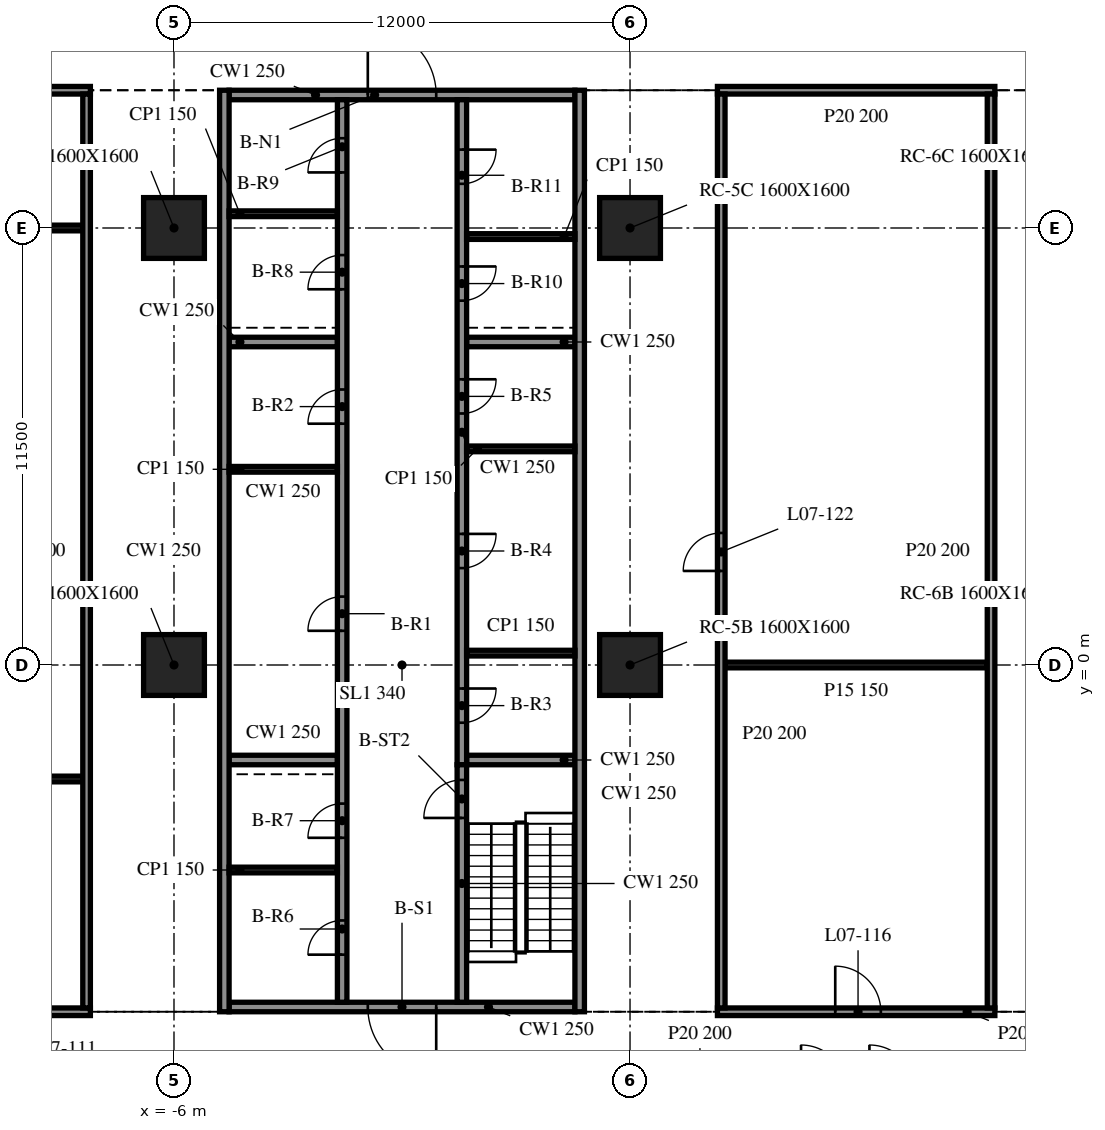
"""IFC4 building model, lengths in metres.
Left out: names, types, materials, properties, quantities, classifications, styles, units other than length and angle.
Written with IfcOpenShell. Run it as: python <this file> out.ifc"""

import sys

from ifc_helpers import new_model, si_unit, direction, frame, frame_2d, origin, origin_2d, place, context, subcontext, project, spatial, rectangle, extrude, element, fill, save


model = new_model("IFC4")
c1 = context("Model", 3, precision=1e-05, world=origin(), true_north=direction((0.0, 1.0)))
c2 = subcontext(c1, "Body", "Model", "MODEL_VIEW")
j1 = project(units=[si_unit("LENGTHUNIT", "METRE"), si_unit("PLANEANGLEUNIT", "RADIAN")], contexts=[c1])
p1 = place(None, origin())
s1 = spatial("IfcSite", under=j1, at=p1, CompositionType="ELEMENT")
p2 = place(p1, origin())
s2 = spatial("IfcBuilding", under=s1, at=p2, CompositionType="ELEMENT")
p3 = place(p2, frame((0.0, 0.0, 33.0)))
s3 = spatial("IfcBuildingStorey", under=s2, at=p3, CompositionType="ELEMENT", Elevation=33.0)
for number, where, z_axis, x_axis in (
    (1, (-6.0, 0.0, -0.34), (0.0, 0.0, 1.0), (1.0, 0.0, 0.0)),
    (2, (-6.0, 11.5, -0.34), (0.0, 0.0, 1.0), (1.0, 0.0, 0.0)),
    (3, (6.0, 0.0, -0.34), (0.0, 0.0, 1.0), (1.0, 0.0, 0.0)),
    (4, (6.0, 11.5, -0.34), (0.0, 0.0, 1.0), (1.0, 0.0, 0.0)),
):
    element("IfcColumn", number, at=place(p3, frame(where, z_axis=z_axis, x_axis=x_axis)), inside=s3, PredefinedType="COLUMN", context=c2, shape_type="SweptSolid", body=[
        extrude(rectangle(XDim=1.6, YDim=1.6, at=origin_2d()), origin(), (0.0, 0.0, 1.0), 4.3),
    ])
for number, where, z_axis, x_axis in (
    (5, (-4.675, 15.125, 0.0), (0.0, 0.0, 1.0), (0.0, -1.0, 0.0)),
    (6, (4.675, -9.125, 0.0), (0.0, 0.0, 1.0), (0.0, 1.0, 0.0)),
):
    element("IfcWall", number, at=place(p3, frame(where, z_axis=z_axis, x_axis=x_axis)), inside=s3, PredefinedType="SOLIDWALL", context=c2, shape_type="SweptSolid", body=[
        extrude(rectangle(XDim=24.25, YDim=0.25, at=frame_2d((12.125, 0.0))), origin(), (0.0, 0.0, 1.0), 3.96),
    ])
p4 = place(p3, frame((4.55, -9.0, 0.0), z_axis=(0.0, 0.0, 1.0), x_axis=(-1.0, 0.0, 0.0)))
e7 = element("IfcWall", 7, at=p4, inside=s3, PredefinedType="SOLIDWALL", context=c2, shape_type="SweptSolid", body=[
    extrude(rectangle(XDim=9.1, YDim=0.25, at=frame_2d((4.55, 0.0))), origin(), (0.0, 0.0, 1.0), 3.96),
])
p5 = place(p4, frame((3.65, 0.0, 0.0)))
e8 = element("IfcOpeningElement", 8, at=p5, cuts=e7, PredefinedType="OPENING", context=c2, shape_type="SweptSolid", body=[
    extrude(rectangle(XDim=1.8, YDim=2.1, at=frame_2d((0.9, 1.05))), frame((0.0, 0.135, 0.0), z_axis=(0.0, -1.0, 0.0), x_axis=(1.0, 0.0, 0.0)), (0.0, 0.0, 1.0), 0.27),
])
p6 = place(p3, frame((-4.55, 15.0, 0.0), z_axis=(0.0, 0.0, 1.0), x_axis=(1.0, 0.0, 0.0)))
e9 = element("IfcWall", 9, at=p6, inside=s3, PredefinedType="SOLIDWALL", context=c2, shape_type="SweptSolid", body=[
    extrude(rectangle(XDim=9.1, YDim=0.25, at=frame_2d((4.55, 0.0))), origin(), (0.0, 0.0, 1.0), 3.96),
])
p7 = place(p6, frame((3.65, 0.0, 0.0)))
e10 = element("IfcOpeningElement", 10, at=p7, cuts=e9, PredefinedType="OPENING", context=c2, shape_type="SweptSolid", body=[
    extrude(rectangle(XDim=1.8, YDim=2.1, at=frame_2d((0.9, 1.05))), frame((0.0, 0.135, 0.0), z_axis=(0.0, -1.0, 0.0), x_axis=(1.0, 0.0, 0.0)), (0.0, 0.0, 1.0), 0.27),
])
p8 = place(p3, frame((-1.575, -8.875, 0.0), z_axis=(0.0, 0.0, 1.0), x_axis=(0.0, 1.0, 0.0)))
e11 = element("IfcWall", 11, at=p8, inside=s3, PredefinedType="SOLIDWALL", context=c2, shape_type="SweptSolid", body=[
    extrude(rectangle(XDim=23.75, YDim=0.25, at=frame_2d((11.875, 0.0))), origin(), (0.0, 0.0, 1.0), 3.96),
])
p9 = place(p8, frame((9.775, 0.0, 0.0)))
e12 = element("IfcOpeningElement", 12, at=p9, cuts=e11, PredefinedType="OPENING", context=c2, shape_type="SweptSolid", body=[
    extrude(rectangle(XDim=0.9, YDim=2.1, at=frame_2d((0.45, 1.05))), frame((0.0, 0.135, 0.0), z_axis=(0.0, -1.0, 0.0), x_axis=(1.0, 0.0, 0.0)), (0.0, 0.0, 1.0), 0.27),
])
p10 = place(p8, frame((15.225, 0.0, 0.0)))
e13 = element("IfcOpeningElement", 13, at=p10, cuts=e11, PredefinedType="OPENING", context=c2, shape_type="SweptSolid", body=[
    extrude(rectangle(XDim=0.9, YDim=2.1, at=frame_2d((0.45, 1.05))), frame((0.0, 0.135, 0.0), z_axis=(0.0, -1.0, 0.0), x_axis=(1.0, 0.0, 0.0)), (0.0, 0.0, 1.0), 0.27),
])
p11 = place(p8, frame((1.252, 0.0, 0.0)))
e14 = element("IfcOpeningElement", 14, at=p11, cuts=e11, PredefinedType="OPENING", context=c2, shape_type="SweptSolid", body=[
    extrude(rectangle(XDim=0.9, YDim=2.1, at=frame_2d((0.45, 1.05))), frame((0.0, 0.135, 0.0), z_axis=(0.0, -1.0, 0.0), x_axis=(1.0, 0.0, 0.0)), (0.0, 0.0, 1.0), 0.27),
])
p12 = place(p8, frame((4.327, 0.0, 0.0)))
e15 = element("IfcOpeningElement", 15, at=p12, cuts=e11, PredefinedType="OPENING", context=c2, shape_type="SweptSolid", body=[
    extrude(rectangle(XDim=0.9, YDim=2.1, at=frame_2d((0.45, 1.05))), frame((0.0, 0.135, 0.0), z_axis=(0.0, -1.0, 0.0), x_axis=(1.0, 0.0, 0.0)), (0.0, 0.0, 1.0), 0.27),
])
p13 = place(p8, frame((18.762, 0.0, 0.0)))
e16 = element("IfcOpeningElement", 16, at=p13, cuts=e11, PredefinedType="OPENING", context=c2, shape_type="SweptSolid", body=[
    extrude(rectangle(XDim=0.9, YDim=2.1, at=frame_2d((0.45, 1.05))), frame((0.0, 0.135, 0.0), z_axis=(0.0, -1.0, 0.0), x_axis=(1.0, 0.0, 0.0)), (0.0, 0.0, 1.0), 0.27),
])
p14 = place(p8, frame((21.837, 0.0, 0.0)))
e17 = element("IfcOpeningElement", 17, at=p14, cuts=e11, PredefinedType="OPENING", context=c2, shape_type="SweptSolid", body=[
    extrude(rectangle(XDim=0.9, YDim=2.1, at=frame_2d((0.45, 1.05))), frame((0.0, 0.135, 0.0), z_axis=(0.0, -1.0, 0.0), x_axis=(1.0, 0.0, 0.0)), (0.0, 0.0, 1.0), 0.27),
])
p15 = place(p3, frame((1.575, -8.875, 0.0), z_axis=(0.0, 0.0, 1.0), x_axis=(0.0, 1.0, 0.0)))
e18 = element("IfcWall", 18, at=p15, inside=s3, PredefinedType="SOLIDWALL", context=c2, shape_type="SweptSolid", body=[
    extrude(rectangle(XDim=6.25, YDim=0.25, at=frame_2d((3.125, 0.0))), origin(), (0.0, 0.0, 1.0), 3.96),
])
p16 = place(p15, frame((4.85, 0.0, 0.0)))
e19 = element("IfcOpeningElement", 19, at=p16, cuts=e18, PredefinedType="OPENING", context=c2, shape_type="SweptSolid", body=[
    extrude(rectangle(XDim=1.0, YDim=2.1, at=frame_2d((0.5, 1.05))), frame((0.0, 0.135, 0.0), z_axis=(0.0, -1.0, 0.0), x_axis=(1.0, 0.0, 0.0)), (0.0, 0.0, 1.0), 0.27),
])
p17 = place(p3, frame((1.575, 14.875, 0.0), z_axis=(0.0, 0.0, 1.0), x_axis=(0.0, -1.0, 0.0)))
e20 = element("IfcWall", 20, at=p17, inside=s3, PredefinedType="SOLIDWALL", context=c2, shape_type="SweptSolid", body=[
    extrude(rectangle(XDim=17.5, YDim=0.25, at=frame_2d((8.75, 0.0))), origin(), (0.0, 0.0, 1.0), 3.96),
])
p18 = place(p17, frame((15.494, 0.0, 0.0)))
e21 = element("IfcOpeningElement", 21, at=p18, cuts=e20, PredefinedType="OPENING", context=c2, shape_type="SweptSolid", body=[
    extrude(rectangle(XDim=0.9, YDim=2.1, at=frame_2d((0.45, 1.05))), frame((0.0, 0.135, 0.0), z_axis=(0.0, -1.0, 0.0), x_axis=(1.0, 0.0, 0.0)), (0.0, 0.0, 1.0), 0.27),
])
p19 = place(p17, frame((11.425, 0.0, 0.0)))
e22 = element("IfcOpeningElement", 22, at=p19, cuts=e20, PredefinedType="OPENING", context=c2, shape_type="SweptSolid", body=[
    extrude(rectangle(XDim=0.9, YDim=2.1, at=frame_2d((0.45, 1.05))), frame((0.0, 0.135, 0.0), z_axis=(0.0, -1.0, 0.0), x_axis=(1.0, 0.0, 0.0)), (0.0, 0.0, 1.0), 0.27),
])
p20 = place(p17, frame((7.356, 0.0, 0.0)))
e23 = element("IfcOpeningElement", 23, at=p20, cuts=e20, PredefinedType="OPENING", context=c2, shape_type="SweptSolid", body=[
    extrude(rectangle(XDim=0.9, YDim=2.1, at=frame_2d((0.45, 1.05))), frame((0.0, 0.135, 0.0), z_axis=(0.0, -1.0, 0.0), x_axis=(1.0, 0.0, 0.0)), (0.0, 0.0, 1.0), 0.27),
])
p21 = place(p17, frame((4.387, 0.0, 0.0)))
e24 = element("IfcOpeningElement", 24, at=p21, cuts=e20, PredefinedType="OPENING", context=c2, shape_type="SweptSolid", body=[
    extrude(rectangle(XDim=0.9, YDim=2.1, at=frame_2d((0.45, 1.05))), frame((0.0, 0.135, 0.0), z_axis=(0.0, -1.0, 0.0), x_axis=(1.0, 0.0, 0.0)), (0.0, 0.0, 1.0), 0.27),
])
p22 = place(p17, frame((1.312, 0.0, 0.0)))
e25 = element("IfcOpeningElement", 25, at=p22, cuts=e20, PredefinedType="OPENING", context=c2, shape_type="SweptSolid", body=[
    extrude(rectangle(XDim=0.9, YDim=2.1, at=frame_2d((0.45, 1.05))), frame((0.0, 0.135, 0.0), z_axis=(0.0, -1.0, 0.0), x_axis=(1.0, 0.0, 0.0)), (0.0, 0.0, 1.0), 0.27),
])
for number, where, z_axis, x_axis in (
    (26, (-4.55, -2.5, 0.0), (0.0, 0.0, 1.0), (1.0, 0.0, 0.0)),
    (27, (-4.55, 8.5, 0.0), (0.0, 0.0, 1.0), (1.0, 0.0, 0.0)),
    (28, (1.7, -2.5, 0.0), (0.0, 0.0, 1.0), (1.0, 0.0, 0.0)),
    (29, (1.7, 8.5, 0.0), (0.0, 0.0, 1.0), (1.0, 0.0, 0.0)),
):
    element("IfcWall", number, at=place(p3, frame(where, z_axis=z_axis, x_axis=x_axis)), inside=s3, PredefinedType="SOLIDWALL", context=c2, shape_type="SweptSolid", body=[
        extrude(rectangle(XDim=2.85, YDim=0.25, at=frame_2d((1.425, 0.0))), origin(), (0.0, 0.0, 1.0), 3.96),
    ])
for number, where, z_axis, x_axis in (
    (30, (-4.55, 5.15, 0.0), (0.0, 0.0, 1.0), (1.0, 0.0, 0.0)),
    (31, (1.7, 0.312, 0.0), (0.0, 0.0, 1.0), (1.0, 0.0, 0.0)),
    (32, (1.7, 5.688, 0.0), (0.0, 0.0, 1.0), (1.0, 0.0, 0.0)),
    (33, (-4.55, -5.395, 0.0), (0.0, 0.0, 1.0), (1.0, 0.0, 0.0)),
    (34, (-4.55, 11.875, 0.0), (0.0, 0.0, 1.0), (1.0, 0.0, 0.0)),
    (35, (1.7, 11.275, 0.0), (0.0, 0.0, 1.0), (1.0, 0.0, 0.0)),
):
    element("IfcWall", number, at=place(p3, frame(where, z_axis=z_axis, x_axis=x_axis)), inside=s3, PredefinedType="PARTITIONING", context=c2, shape_type="SweptSolid", body=[
        extrude(rectangle(XDim=2.85, YDim=0.15, at=frame_2d((1.425, 0.0))), origin(), (0.0, 0.0, 1.0), 3.96),
    ])
p23 = place(p3, frame((-15.9, -9.125, 0.0), z_axis=(0.0, 0.0, 1.0), x_axis=(1.0, 0.0, 0.0)))
e36 = element("IfcWall", 36, at=p23, inside=s3, PredefinedType="PARTITIONING", context=c2, shape_type="SweptSolid", body=[
    extrude(rectangle(XDim=7.7, YDim=0.2, at=frame_2d((3.85, 0.0))), origin(), (0.0, 0.0, 1.0), 3.96),
])
p24 = place(p23, frame((3.3, 0.0, 0.0)))
e37 = element("IfcOpeningElement", 37, at=p24, cuts=e36, PredefinedType="OPENING", context=c2, shape_type="SweptSolid", body=[
    extrude(rectangle(XDim=1.2, YDim=2.1, at=frame_2d((0.6, 1.05))), frame((0.0, 0.11, 0.0), z_axis=(0.0, -1.0, 0.0), x_axis=(1.0, 0.0, 0.0)), (0.0, 0.0, 1.0), 0.22),
])
p25 = place(p3, frame((8.3, -9.125, 0.0), z_axis=(0.0, 0.0, 1.0), x_axis=(1.0, 0.0, 0.0)))
e38 = element("IfcWall", 38, at=p25, inside=s3, PredefinedType="PARTITIONING", context=c2, shape_type="SweptSolid", body=[
    extrude(rectangle(XDim=7.3, YDim=0.2, at=frame_2d((3.65, 0.0))), origin(), (0.0, 0.0, 1.0), 3.96),
])
p26 = place(p25, frame((3.1, 0.0, 0.0)))
e39 = element("IfcOpeningElement", 39, at=p26, cuts=e38, PredefinedType="OPENING", context=c2, shape_type="SweptSolid", body=[
    extrude(rectangle(XDim=1.2, YDim=2.1, at=frame_2d((0.6, 1.05))), frame((0.0, 0.11, 0.0), z_axis=(0.0, -1.0, 0.0), x_axis=(1.0, 0.0, 0.0)), (0.0, 0.0, 1.0), 0.22),
])
p27 = place(p3, frame((-15.7, -3.0, 0.0), z_axis=(0.0, 0.0, 1.0), x_axis=(1.0, 0.0, 0.0)))
e40 = element("IfcWall", 40, at=p27, inside=s3, PredefinedType="PARTITIONING", context=c2, shape_type="SweptSolid", body=[
    extrude(rectangle(XDim=7.3, YDim=0.15, at=frame_2d((3.65, 0.0))), origin(), (0.0, 0.0, 1.0), 3.96),
])
p28 = place(p3, frame((8.5, 0.0, 0.0), z_axis=(0.0, 0.0, 1.0), x_axis=(1.0, 0.0, 0.0)))
e41 = element("IfcWall", 41, at=p28, inside=s3, PredefinedType="PARTITIONING", context=c2, shape_type="SweptSolid", body=[
    extrude(rectangle(XDim=6.9, YDim=0.15, at=frame_2d((3.45, 0.0))), origin(), (0.0, 0.0, 1.0), 3.96),
])
p29 = place(p3, frame((-15.7, 11.5, 0.0), z_axis=(0.0, 0.0, 1.0), x_axis=(1.0, 0.0, 0.0)))
e42 = element("IfcWall", 42, at=p29, inside=s3, PredefinedType="PARTITIONING", context=c2, shape_type="SweptSolid", body=[
    extrude(rectangle(XDim=7.3, YDim=0.15, at=frame_2d((3.65, 0.0))), origin(), (0.0, 0.0, 1.0), 3.96),
])
p30 = place(p3, frame((-15.9, 15.125, 0.0), z_axis=(0.0, 0.0, 1.0), x_axis=(1.0, 0.0, 0.0)))
e43 = element("IfcWall", 43, at=p30, inside=s3, PredefinedType="PARTITIONING", context=c2, shape_type="SweptSolid", body=[
    extrude(rectangle(XDim=7.7, YDim=0.2, at=frame_2d((3.85, 0.0))), origin(), (0.0, 0.0, 1.0), 3.96),
])
p31 = place(p30, frame((3.3, 0.0, 0.0)))
e44 = element("IfcOpeningElement", 44, at=p31, cuts=e43, PredefinedType="OPENING", context=c2, shape_type="SweptSolid", body=[
    extrude(rectangle(XDim=1.0, YDim=2.1, at=frame_2d((0.5, 1.05))), frame((0.0, 0.11, 0.0), z_axis=(0.0, -1.0, 0.0), x_axis=(1.0, 0.0, 0.0)), (0.0, 0.0, 1.0), 0.22),
])
p32 = place(p3, frame((8.3, 15.125, 0.0), z_axis=(0.0, 0.0, 1.0), x_axis=(1.0, 0.0, 0.0)))
e45 = element("IfcWall", 45, at=p32, inside=s3, PredefinedType="PARTITIONING", context=c2, shape_type="SweptSolid", body=[
    extrude(rectangle(XDim=7.3, YDim=0.2, at=frame_2d((3.65, 0.0))), origin(), (0.0, 0.0, 1.0), 3.96),
])
p33 = place(p3, frame((-8.3, -9.025, 0.0), z_axis=(0.0, 0.0, 1.0), x_axis=(0.0, 1.0, 0.0)))
e46 = element("IfcWall", 46, at=p33, inside=s3, PredefinedType="PARTITIONING", context=c2, shape_type="SweptSolid", body=[
    extrude(rectangle(XDim=24.05, YDim=0.2, at=frame_2d((12.025, 0.0))), origin(), (0.0, 0.0, 1.0), 3.96),
])
p34 = place(p3, frame((8.4, -9.025, 0.0), z_axis=(0.0, 0.0, 1.0), x_axis=(0.0, 1.0, 0.0)))
e47 = element("IfcWall", 47, at=p34, inside=s3, PredefinedType="PARTITIONING", context=c2, shape_type="SweptSolid", body=[
    extrude(rectangle(XDim=24.05, YDim=0.2, at=frame_2d((12.025, 0.0))), origin(), (0.0, 0.0, 1.0), 3.96),
])
p35 = place(p34, frame((11.5, 0.0, 0.0)))
e48 = element("IfcOpeningElement", 48, at=p35, cuts=e47, PredefinedType="OPENING", context=c2, shape_type="SweptSolid", body=[
    extrude(rectangle(XDim=1.0, YDim=2.1, at=frame_2d((0.5, 1.05))), frame((0.0, 0.11, 0.0), z_axis=(0.0, -1.0, 0.0), x_axis=(1.0, 0.0, 0.0)), (0.0, 0.0, 1.0), 0.22),
])
p36 = place(p3, frame((15.5, -9.025, 0.0), z_axis=(0.0, 0.0, 1.0), x_axis=(0.0, 1.0, 0.0)))
e49 = element("IfcWall", 49, at=p36, inside=s3, PredefinedType="PARTITIONING", context=c2, shape_type="SweptSolid", body=[
    extrude(rectangle(XDim=24.05, YDim=0.2, at=frame_2d((12.025, 0.0))), origin(), (0.0, 0.0, 1.0), 3.96),
])
p37 = place(p5, origin())
e50 = element("IfcDoor", 50, at=p37, inside=s3, OperationType="DOUBLE_DOOR_SINGLE_SWING", PredefinedType="DOOR", context=c2, shape_type="SweptSolid", body=[
    extrude(rectangle(XDim=1.8, YDim=2.1, at=frame_2d((0.9, 1.05))), frame((0.0, 0.025, 0.0), z_axis=(0.0, -1.0, 0.0), x_axis=(1.0, 0.0, 0.0)), (0.0, 0.0, 1.0), 0.05),
])
fill(e8, e50)
p38 = place(p7, origin())
e51 = element("IfcDoor", 51, at=p38, inside=s3, OperationType="DOUBLE_DOOR_SINGLE_SWING", PredefinedType="DOOR", context=c2, shape_type="SweptSolid", body=[
    extrude(rectangle(XDim=1.8, YDim=2.1, at=frame_2d((0.9, 1.05))), frame((0.0, 0.025, 0.0), z_axis=(0.0, -1.0, 0.0), x_axis=(1.0, 0.0, 0.0)), (0.0, 0.0, 1.0), 0.05),
])
fill(e10, e51)
p39 = place(p9, origin())
e52 = element("IfcDoor", 52, at=p39, inside=s3, OperationType="SINGLE_SWING_LEFT", PredefinedType="DOOR", context=c2, shape_type="SweptSolid", body=[
    extrude(rectangle(XDim=0.9, YDim=2.1, at=frame_2d((0.45, 1.05))), frame((0.0, 0.025, 0.0), z_axis=(0.0, -1.0, 0.0), x_axis=(1.0, 0.0, 0.0)), (0.0, 0.0, 1.0), 0.05),
])
fill(e12, e52)
p40 = place(p10, origin())
e53 = element("IfcDoor", 53, at=p40, inside=s3, OperationType="SINGLE_SWING_RIGHT", PredefinedType="DOOR", context=c2, shape_type="SweptSolid", body=[
    extrude(rectangle(XDim=0.9, YDim=2.1, at=frame_2d((0.45, 1.05))), frame((0.0, 0.025, 0.0), z_axis=(0.0, -1.0, 0.0), x_axis=(1.0, 0.0, 0.0)), (0.0, 0.0, 1.0), 0.05),
])
fill(e13, e53)
p41 = place(p18, origin())
e54 = element("IfcDoor", 54, at=p41, inside=s3, OperationType="SINGLE_SWING_LEFT", PredefinedType="DOOR", context=c2, shape_type="SweptSolid", body=[
    extrude(rectangle(XDim=0.9, YDim=2.1, at=frame_2d((0.45, 1.05))), frame((0.0, 0.025, 0.0), z_axis=(0.0, -1.0, 0.0), x_axis=(1.0, 0.0, 0.0)), (0.0, 0.0, 1.0), 0.05),
])
fill(e21, e54)
p42 = place(p19, origin())
e55 = element("IfcDoor", 55, at=p42, inside=s3, OperationType="SINGLE_SWING_RIGHT", PredefinedType="DOOR", context=c2, shape_type="SweptSolid", body=[
    extrude(rectangle(XDim=0.9, YDim=2.1, at=frame_2d((0.45, 1.05))), frame((0.0, 0.025, 0.0), z_axis=(0.0, -1.0, 0.0), x_axis=(1.0, 0.0, 0.0)), (0.0, 0.0, 1.0), 0.05),
])
fill(e22, e55)
p43 = place(p20, origin())
e56 = element("IfcDoor", 56, at=p43, inside=s3, OperationType="SINGLE_SWING_LEFT", PredefinedType="DOOR", context=c2, shape_type="SweptSolid", body=[
    extrude(rectangle(XDim=0.9, YDim=2.1, at=frame_2d((0.45, 1.05))), frame((0.0, 0.025, 0.0), z_axis=(0.0, -1.0, 0.0), x_axis=(1.0, 0.0, 0.0)), (0.0, 0.0, 1.0), 0.05),
])
fill(e23, e56)
p44 = place(p11, origin())
e57 = element("IfcDoor", 57, at=p44, inside=s3, OperationType="SINGLE_SWING_RIGHT", PredefinedType="DOOR", context=c2, shape_type="SweptSolid", body=[
    extrude(rectangle(XDim=0.9, YDim=2.1, at=frame_2d((0.45, 1.05))), frame((0.0, 0.025, 0.0), z_axis=(0.0, -1.0, 0.0), x_axis=(1.0, 0.0, 0.0)), (0.0, 0.0, 1.0), 0.05),
])
fill(e14, e57)
p45 = place(p12, origin())
e58 = element("IfcDoor", 58, at=p45, inside=s3, OperationType="SINGLE_SWING_LEFT", PredefinedType="DOOR", context=c2, shape_type="SweptSolid", body=[
    extrude(rectangle(XDim=0.9, YDim=2.1, at=frame_2d((0.45, 1.05))), frame((0.0, 0.025, 0.0), z_axis=(0.0, -1.0, 0.0), x_axis=(1.0, 0.0, 0.0)), (0.0, 0.0, 1.0), 0.05),
])
fill(e15, e58)
p46 = place(p13, origin())
e59 = element("IfcDoor", 59, at=p46, inside=s3, OperationType="SINGLE_SWING_RIGHT", PredefinedType="DOOR", context=c2, shape_type="SweptSolid", body=[
    extrude(rectangle(XDim=0.9, YDim=2.1, at=frame_2d((0.45, 1.05))), frame((0.0, 0.025, 0.0), z_axis=(0.0, -1.0, 0.0), x_axis=(1.0, 0.0, 0.0)), (0.0, 0.0, 1.0), 0.05),
])
fill(e16, e59)
p47 = place(p14, origin())
e60 = element("IfcDoor", 60, at=p47, inside=s3, OperationType="SINGLE_SWING_LEFT", PredefinedType="DOOR", context=c2, shape_type="SweptSolid", body=[
    extrude(rectangle(XDim=0.9, YDim=2.1, at=frame_2d((0.45, 1.05))), frame((0.0, 0.025, 0.0), z_axis=(0.0, -1.0, 0.0), x_axis=(1.0, 0.0, 0.0)), (0.0, 0.0, 1.0), 0.05),
])
fill(e17, e60)
p48 = place(p21, origin())
e61 = element("IfcDoor", 61, at=p48, inside=s3, OperationType="SINGLE_SWING_RIGHT", PredefinedType="DOOR", context=c2, shape_type="SweptSolid", body=[
    extrude(rectangle(XDim=0.9, YDim=2.1, at=frame_2d((0.45, 1.05))), frame((0.0, 0.025, 0.0), z_axis=(0.0, -1.0, 0.0), x_axis=(1.0, 0.0, 0.0)), (0.0, 0.0, 1.0), 0.05),
])
fill(e24, e61)
p49 = place(p22, origin())
e62 = element("IfcDoor", 62, at=p49, inside=s3, OperationType="SINGLE_SWING_LEFT", PredefinedType="DOOR", context=c2, shape_type="SweptSolid", body=[
    extrude(rectangle(XDim=0.9, YDim=2.1, at=frame_2d((0.45, 1.05))), frame((0.0, 0.025, 0.0), z_axis=(0.0, -1.0, 0.0), x_axis=(1.0, 0.0, 0.0)), (0.0, 0.0, 1.0), 0.05),
])
fill(e25, e62)
p50 = place(p16, origin())
e63 = element("IfcDoor", 63, at=p50, inside=s3, OperationType="SINGLE_SWING_RIGHT", PredefinedType="DOOR", context=c2, shape_type="SweptSolid", body=[
    extrude(rectangle(XDim=1.0, YDim=2.1, at=frame_2d((0.5, 1.05))), frame((0.0, 0.025, 0.0), z_axis=(0.0, -1.0, 0.0), x_axis=(1.0, 0.0, 0.0)), (0.0, 0.0, 1.0), 0.05),
])
fill(e19, e63)
p51 = place(p26, origin())
e64 = element("IfcDoor", 64, at=p51, inside=s3, OperationType="SINGLE_SWING_RIGHT", PredefinedType="DOOR", context=c2, shape_type="SweptSolid", body=[
    extrude(rectangle(XDim=1.2, YDim=2.1, at=frame_2d((0.6, 1.05))), frame((0.0, 0.025, 0.0), z_axis=(0.0, -1.0, 0.0), x_axis=(1.0, 0.0, 0.0)), (0.0, 0.0, 1.0), 0.05),
])
fill(e39, e64)
p52 = place(p35, origin())
e65 = element("IfcDoor", 65, at=p52, inside=s3, OperationType="SINGLE_SWING_RIGHT", PredefinedType="DOOR", context=c2, shape_type="SweptSolid", body=[
    extrude(rectangle(XDim=1.0, YDim=2.1, at=frame_2d((0.5, 1.05))), frame((0.0, 0.025, 0.0), z_axis=(0.0, -1.0, 0.0), x_axis=(1.0, 0.0, 0.0)), (0.0, 0.0, 1.0), 0.05),
])
fill(e48, e65)
save(model, sys.argv[1])
